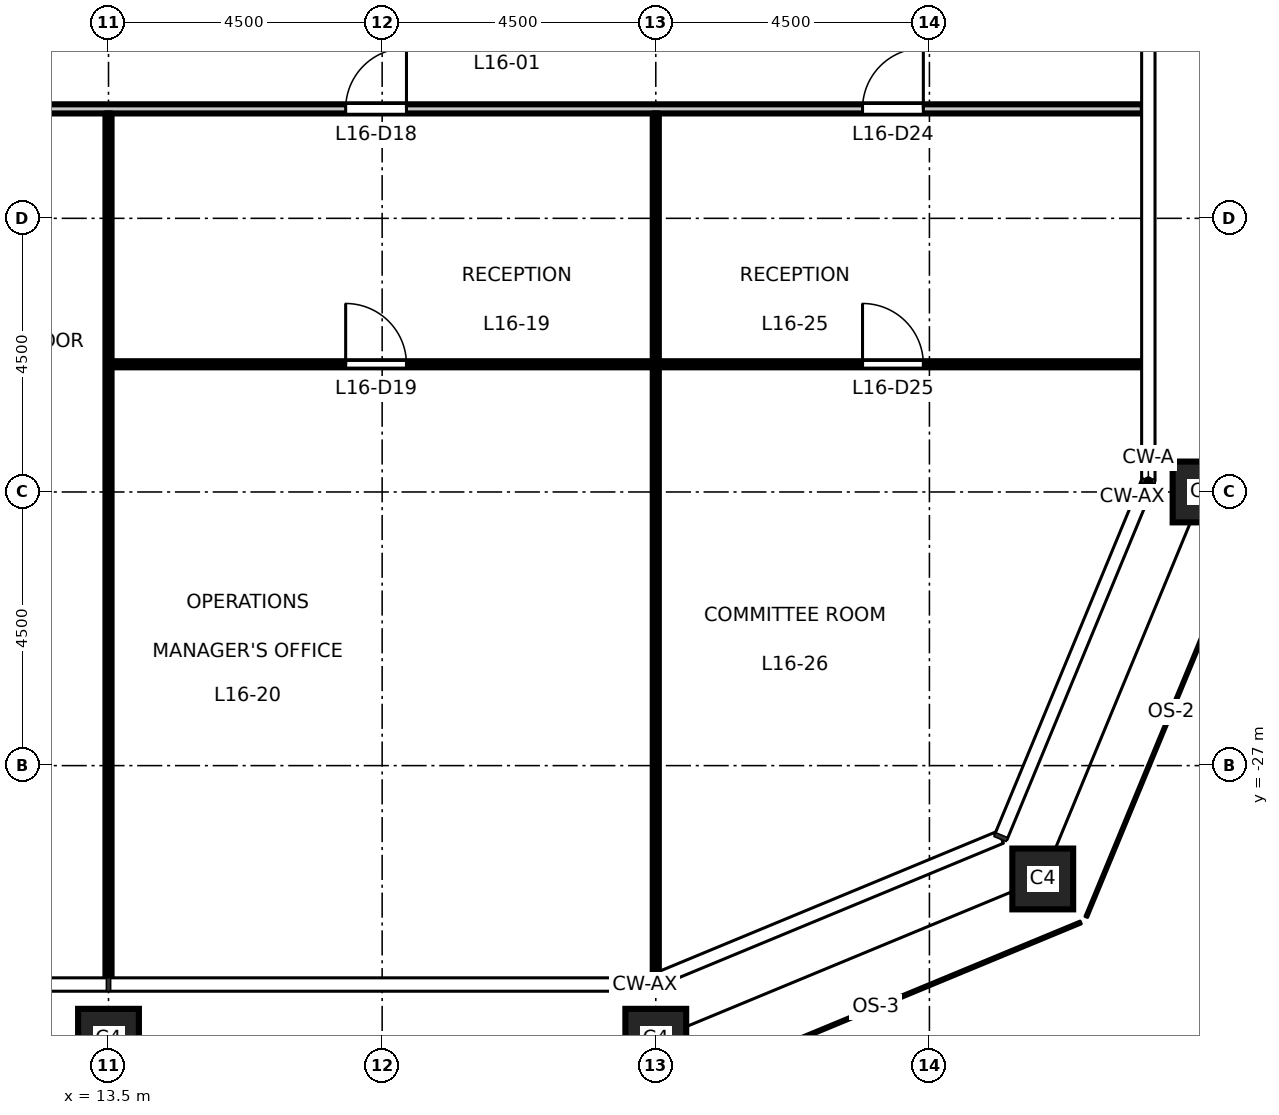
"""IFC4 building model, lengths in metres.
Left out: names, types, materials, properties, quantities, classifications, styles, units other than length and angle.
Written with IfcOpenShell. Run it as: python <this file> out.ifc"""

import sys

from ifc_helpers import new_model, si_unit, direction, frame, frame_2d, origin, origin_2d, place, context, subcontext, project, spatial, rectangle, hollow_rectangle, extrude, element, fill, save


model = new_model("IFC4")
c1 = context("Model", 3, precision=1e-05, world=origin(), true_north=direction((0.0, 1.0)))
c2 = subcontext(c1, "Body", "Model", "MODEL_VIEW")
j1 = project(units=[si_unit("LENGTHUNIT", "METRE"), si_unit("PLANEANGLEUNIT", "RADIAN")], contexts=[c1])
p1 = place(None, origin())
s1 = spatial("IfcSite", under=j1, at=p1, CompositionType="ELEMENT")
p2 = place(p1, origin())
s2 = spatial("IfcBuilding", under=s1, at=p2, CompositionType="ELEMENT")
p3 = place(p2, frame((0.0, 0.0, 76.2)))
s3 = spatial("IfcBuildingStorey", under=s2, at=p3, CompositionType="ELEMENT", Elevation=76.2)
for number, where, z_axis, x_axis in (
    (1, (13.5, -31.5, 0.0), (0.0, 0.0, 1.0), (1.0, 0.0, 0.0)),
    (2, (22.5, -31.5, 0.0), (0.0, 0.0, 1.0), (1.0, 0.0, 0.0)),
    (3, (28.864, -28.864, 0.0), (0.0, 0.0, 1.0), (1.0, 0.0, 0.0)),
    (4, (31.5, -22.5, 0.0), (0.0, 0.0, 1.0), (1.0, 0.0, 0.0)),
):
    element("IfcColumn", number, at=place(p3, frame(where, z_axis=z_axis, x_axis=x_axis)), inside=s3, PredefinedType="COLUMN", context=c2, shape_type="SweptSolid", body=[
        extrude(hollow_rectangle(XDim=1.0, YDim=1.0, WallThickness=0.06, at=origin_2d()), origin(), (0.0, 0.0, 1.0), 4.5),
    ])
p4 = place(p3, frame((13.55, -20.4, 0.0), z_axis=(0.0, 0.0, 1.0), x_axis=(1.0, 0.0, 0.0)))
e5 = element("IfcWall", 5, at=p4, inside=s3, PredefinedType="PARTITIONING", context=c2, shape_type="SweptSolid", body=[
    extrude(rectangle(XDim=16.96, YDim=0.1, at=frame_2d((8.48, 0.0))), origin(), (0.0, 0.0, 1.0), 4.35),
])
p5 = place(p4, frame((3.85, 0.0, 0.0)))
e6 = element("IfcOpeningElement", 6, at=p5, cuts=e5, PredefinedType="OPENING", context=c2, shape_type="SweptSolid", body=[
    extrude(rectangle(XDim=1.0, YDim=2.1, at=frame_2d((0.5, 1.05))), frame((0.0, 0.06, 0.0), z_axis=(0.0, -1.0, 0.0), x_axis=(1.0, 0.0, 0.0)), (0.0, 0.0, 1.0), 0.12),
])
p6 = place(p4, frame((12.35, 0.0, 0.0)))
e7 = element("IfcOpeningElement", 7, at=p6, cuts=e5, PredefinedType="OPENING", context=c2, shape_type="SweptSolid", body=[
    extrude(rectangle(XDim=1.0, YDim=2.1, at=frame_2d((0.5, 1.05))), frame((0.0, 0.06, 0.0), z_axis=(0.0, -1.0, 0.0), x_axis=(1.0, 0.0, 0.0)), (0.0, 0.0, 1.0), 0.12),
])
p7 = place(p3, frame((-30.51, -16.2, 0.0), z_axis=(0.0, 0.0, 1.0), x_axis=(1.0, 0.0, 0.0)))
e8 = element("IfcWall", 8, at=p7, inside=s3, PredefinedType="PARTITIONING", context=c2, shape_type="SweptSolid", body=[
    extrude(rectangle(XDim=61.02, YDim=0.15, at=frame_2d((30.51, 0.0))), origin(), (0.0, 0.0, 1.0), 4.35),
])
p8 = place(p7, frame((11.91, 0.0, 0.0)))
e9 = element("IfcOpeningElement", 9, at=p8, cuts=e8, PredefinedType="OPENING", context=c2, shape_type="SweptSolid", body=[
    extrude(rectangle(XDim=1.0, YDim=2.1, at=frame_2d((0.5, 1.05))), frame((0.0, 0.085, 0.0), z_axis=(0.0, -1.0, 0.0), x_axis=(1.0, 0.0, 0.0)), (0.0, 0.0, 1.0), 0.17),
])
p9 = place(p7, frame((20.91, 0.0, 0.0)))
e10 = element("IfcOpeningElement", 10, at=p9, cuts=e8, PredefinedType="OPENING", context=c2, shape_type="SweptSolid", body=[
    extrude(rectangle(XDim=1.0, YDim=2.1, at=frame_2d((0.5, 1.05))), frame((0.0, 0.085, 0.0), z_axis=(0.0, -1.0, 0.0), x_axis=(1.0, 0.0, 0.0)), (0.0, 0.0, 1.0), 0.17),
])
p10 = place(p7, frame((29.91, 0.0, 0.0)))
e11 = element("IfcOpeningElement", 11, at=p10, cuts=e8, PredefinedType="OPENING", context=c2, shape_type="SweptSolid", body=[
    extrude(rectangle(XDim=1.0, YDim=2.1, at=frame_2d((0.5, 1.05))), frame((0.0, 0.085, 0.0), z_axis=(0.0, -1.0, 0.0), x_axis=(1.0, 0.0, 0.0)), (0.0, 0.0, 1.0), 0.17),
])
p11 = place(p7, frame((38.91, 0.0, 0.0)))
e12 = element("IfcOpeningElement", 12, at=p11, cuts=e8, PredefinedType="OPENING", context=c2, shape_type="SweptSolid", body=[
    extrude(rectangle(XDim=1.0, YDim=2.1, at=frame_2d((0.5, 1.05))), frame((0.0, 0.085, 0.0), z_axis=(0.0, -1.0, 0.0), x_axis=(1.0, 0.0, 0.0)), (0.0, 0.0, 1.0), 0.17),
])
p12 = place(p7, frame((47.91, 0.0, 0.0)))
e13 = element("IfcOpeningElement", 13, at=p12, cuts=e8, PredefinedType="OPENING", context=c2, shape_type="SweptSolid", body=[
    extrude(rectangle(XDim=1.0, YDim=2.1, at=frame_2d((0.5, 1.05))), frame((0.0, 0.085, 0.0), z_axis=(0.0, -1.0, 0.0), x_axis=(1.0, 0.0, 0.0)), (0.0, 0.0, 1.0), 0.17),
])
p13 = place(p7, frame((3.4, 0.0, 0.0)))
e14 = element("IfcOpeningElement", 14, at=p13, cuts=e8, PredefinedType="OPENING", context=c2, shape_type="SweptSolid", body=[
    extrude(rectangle(XDim=1.0, YDim=2.1, at=frame_2d((0.5, 1.05))), frame((0.0, 0.085, 0.0), z_axis=(0.0, -1.0, 0.0), x_axis=(1.0, 0.0, 0.0)), (0.0, 0.0, 1.0), 0.17),
])
p14 = place(p7, frame((56.41, 0.0, 0.0)))
e15 = element("IfcOpeningElement", 15, at=p14, cuts=e8, PredefinedType="OPENING", context=c2, shape_type="SweptSolid", body=[
    extrude(rectangle(XDim=1.0, YDim=2.1, at=frame_2d((0.5, 1.05))), frame((0.0, 0.085, 0.0), z_axis=(0.0, -1.0, 0.0), x_axis=(1.0, 0.0, 0.0)), (0.0, 0.0, 1.0), 0.17),
])
p15 = place(p3, frame((13.5, -30.51, 0.0), z_axis=(0.0, 0.0, 1.0), x_axis=(0.0, 1.0, 0.0)))
e16 = element("IfcWall", 16, at=p15, inside=s3, PredefinedType="PARTITIONING", context=c2, shape_type="SweptSolid", body=[
    extrude(rectangle(XDim=14.235, YDim=0.1, at=frame_2d((7.118, 0.0))), origin(), (0.0, 0.0, 1.0), 3.35),
])
p16 = place(p3, frame((22.5, -30.428, 0.0), z_axis=(0.0, 0.0, 1.0), x_axis=(0.0, 1.0, 0.0)))
e17 = element("IfcWall", 17, at=p16, inside=s3, PredefinedType="PARTITIONING", context=c2, shape_type="SweptSolid", body=[
    extrude(rectangle(XDim=9.978, YDim=0.1, at=frame_2d((4.989, 0.0))), origin(), (0.0, 0.0, 1.0), 3.35),
])
p17 = place(p3, frame((22.5, -20.35, 0.0), z_axis=(0.0, 0.0, 1.0), x_axis=(0.0, 1.0, 0.0)))
e18 = element("IfcWall", 18, at=p17, inside=s3, PredefinedType="PARTITIONING", context=c2, shape_type="SweptSolid", body=[
    extrude(rectangle(XDim=4.075, YDim=0.1, at=frame_2d((2.038, 0.0))), origin(), (0.0, 0.0, 1.0), 3.35),
])
p18 = place(p12, origin())
e19 = element("IfcDoor", 19, at=p18, inside=s3, OperationType="SINGLE_SWING_RIGHT", PredefinedType="DOOR", context=c2, shape_type="SweptSolid", body=[
    extrude(rectangle(XDim=1.0, YDim=2.1, at=frame_2d((0.5, 1.05))), frame((0.0, 0.025, 0.0), z_axis=(0.0, -1.0, 0.0), x_axis=(1.0, 0.0, 0.0)), (0.0, 0.0, 1.0), 0.05),
])
fill(e13, e19)
p19 = place(p5, origin())
e20 = element("IfcDoor", 20, at=p19, inside=s3, OperationType="SINGLE_SWING_LEFT", PredefinedType="DOOR", context=c2, shape_type="SweptSolid", body=[
    extrude(rectangle(XDim=1.0, YDim=2.1, at=frame_2d((0.5, 1.05))), frame((0.0, 0.025, 0.0), z_axis=(0.0, -1.0, 0.0), x_axis=(1.0, 0.0, 0.0)), (0.0, 0.0, 1.0), 0.05),
])
fill(e6, e20)
p20 = place(p14, origin())
e21 = element("IfcDoor", 21, at=p20, inside=s3, OperationType="SINGLE_SWING_RIGHT", PredefinedType="DOOR", context=c2, shape_type="SweptSolid", body=[
    extrude(rectangle(XDim=1.0, YDim=2.1, at=frame_2d((0.5, 1.05))), frame((0.0, 0.025, 0.0), z_axis=(0.0, -1.0, 0.0), x_axis=(1.0, 0.0, 0.0)), (0.0, 0.0, 1.0), 0.05),
])
fill(e15, e21)
p21 = place(p6, origin())
e22 = element("IfcDoor", 22, at=p21, inside=s3, OperationType="SINGLE_SWING_LEFT", PredefinedType="DOOR", context=c2, shape_type="SweptSolid", body=[
    extrude(rectangle(XDim=1.0, YDim=2.1, at=frame_2d((0.5, 1.05))), frame((0.0, 0.025, 0.0), z_axis=(0.0, -1.0, 0.0), x_axis=(1.0, 0.0, 0.0)), (0.0, 0.0, 1.0), 0.05),
])
fill(e7, e22)
save(model, sys.argv[1])
